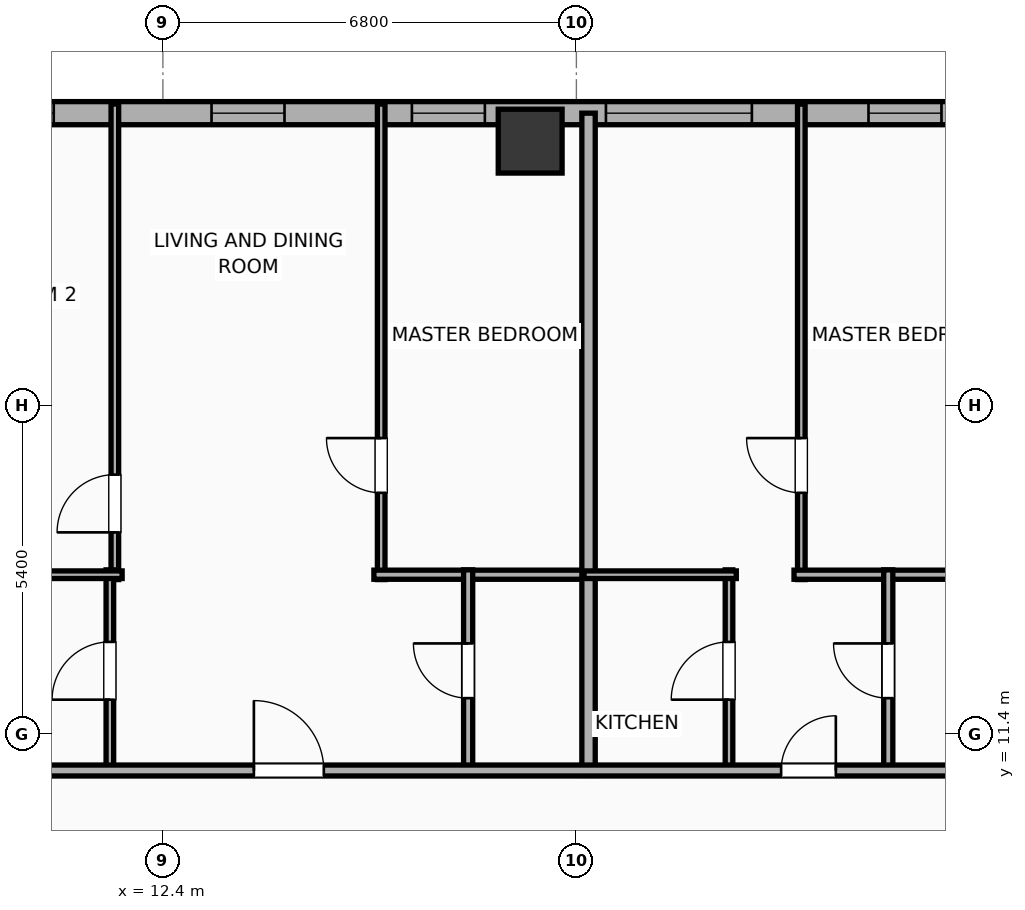
"""IFC4 building model, lengths in metres.
Left out: names, types, materials, properties, quantities, classifications, styles, units other than length and angle.
Written with IfcOpenShell. Run it as: python <this file> out.ifc"""

import sys

from ifc_helpers import new_model, si_unit, direction, frame, frame_2d, origin, origin_2d, place, context, subcontext, project, spatial, rectangle, hollow_rectangle, extrude, element, fill, save


model = new_model("IFC4")
c1 = context("Model", 3, precision=1e-05, world=origin(), true_north=direction((0.0, 1.0)))
c2 = subcontext(c1, "Body", "Model", "MODEL_VIEW")
j1 = project(units=[si_unit("LENGTHUNIT", "METRE"), si_unit("PLANEANGLEUNIT", "RADIAN")], contexts=[c1])
p1 = place(None, origin())
s1 = spatial("IfcSite", under=j1, at=p1, CompositionType="ELEMENT")
p2 = place(p1, origin())
s2 = spatial("IfcBuilding", under=s1, at=p2, CompositionType="ELEMENT")
p3 = place(p2, frame((0.0, 0.0, 109.2)))
s3 = spatial("IfcBuildingStorey", under=s2, at=p3, CompositionType="ELEMENT", Elevation=109.2)
p4 = place(p3, frame((18.44, 21.15, 0.0), z_axis=(0.0, 0.0, 1.0), x_axis=(1.0, 0.0, 0.0)))
e1 = element("IfcColumn", 1, at=p4, inside=s3, PredefinedType="COLUMN", context=c2, shape_type="SweptSolid", body=[
    extrude(hollow_rectangle(XDim=1.05, YDim=1.05, WallThickness=0.036, at=origin_2d()), origin(), (0.0, 0.0, 1.0), 3.9),
])
p5 = place(p3, frame((-25.381, 21.61, 0.0), z_axis=(0.0, 0.0, 1.0), x_axis=(1.0, 0.0, 0.0)))
e2 = element("IfcWall", 2, at=p5, inside=s3, PredefinedType="ELEMENTEDWALL", context=c2, shape_type="SweptSolid", body=[
    extrude(rectangle(XDim=54.763, YDim=0.38, at=frame_2d((27.381, 0.0))), origin(), (0.0, 0.0, 1.0), 3.65),
])
p6 = place(p5, frame((5.645, 0.0, 0.75)))
e3 = element("IfcOpeningElement", 3, at=p6, cuts=e2, PredefinedType="OPENING", context=c2, shape_type="SweptSolid", body=[
    extrude(rectangle(XDim=2.4, YDim=2.1, at=frame_2d((1.2, 1.05))), frame((0.0, 0.2, 0.0), z_axis=(0.0, -1.0, 0.0), x_axis=(1.0, 0.0, 0.0)), (0.0, 0.0, 1.0), 0.4),
])
p7 = place(p5, frame((45.067, 0.0, 0.75)))
e4 = element("IfcOpeningElement", 4, at=p7, cuts=e2, PredefinedType="OPENING", context=c2, shape_type="SweptSolid", body=[
    extrude(rectangle(XDim=2.4, YDim=2.1, at=frame_2d((1.2, 1.05))), frame((0.0, 0.2, 0.0), z_axis=(0.0, -1.0, 0.0), x_axis=(1.0, 0.0, 0.0)), (0.0, 0.0, 1.0), 0.4),
])
p8 = place(p5, frame((1.831, 0.0, 0.75)))
e5 = element("IfcOpeningElement", 5, at=p8, cuts=e2, PredefinedType="OPENING", context=c2, shape_type="SweptSolid", body=[
    extrude(rectangle(XDim=1.2, YDim=2.05, at=frame_2d((0.6, 1.025))), frame((0.0, 0.2, 0.0), z_axis=(0.0, -1.0, 0.0), x_axis=(1.0, 0.0, 0.0)), (0.0, 0.0, 1.0), 0.4),
])
p9 = place(p5, frame((8.996, 0.0, 0.75)))
e6 = element("IfcOpeningElement", 6, at=p9, cuts=e2, PredefinedType="OPENING", context=c2, shape_type="SweptSolid", body=[
    extrude(rectangle(XDim=1.2, YDim=2.05, at=frame_2d((0.6, 1.025))), frame((0.0, 0.2, 0.0), z_axis=(0.0, -1.0, 0.0), x_axis=(1.0, 0.0, 0.0)), (0.0, 0.0, 1.0), 0.4),
])
p10 = place(p5, frame((15.102, 0.0, 0.75)))
e7 = element("IfcOpeningElement", 7, at=p10, cuts=e2, PredefinedType="OPENING", context=c2, shape_type="SweptSolid", body=[
    extrude(rectangle(XDim=1.2, YDim=2.05, at=frame_2d((0.6, 1.025))), frame((0.0, 0.2, 0.0), z_axis=(0.0, -1.0, 0.0), x_axis=(1.0, 0.0, 0.0)), (0.0, 0.0, 1.0), 0.4),
])
p11 = place(p5, frame((12.352, 0.0, 0.75)))
e8 = element("IfcOpeningElement", 8, at=p11, cuts=e2, PredefinedType="OPENING", context=c2, shape_type="SweptSolid", body=[
    extrude(rectangle(XDim=1.2, YDim=2.05, at=frame_2d((0.6, 1.025))), frame((0.0, 0.2, 0.0), z_axis=(0.0, -1.0, 0.0), x_axis=(1.0, 0.0, 0.0)), (0.0, 0.0, 1.0), 0.4),
])
p12 = place(p5, frame((19.936, 0.0, 0.75)))
e9 = element("IfcOpeningElement", 9, at=p12, cuts=e2, PredefinedType="OPENING", context=c2, shape_type="SweptSolid", body=[
    extrude(rectangle(XDim=1.2, YDim=2.05, at=frame_2d((0.6, 1.025))), frame((0.0, 0.2, 0.0), z_axis=(0.0, -1.0, 0.0), x_axis=(1.0, 0.0, 0.0)), (0.0, 0.0, 1.0), 0.4),
])
p13 = place(p5, frame((17.786, 0.0, 0.75)))
e10 = element("IfcOpeningElement", 10, at=p13, cuts=e2, PredefinedType="OPENING", context=c2, shape_type="SweptSolid", body=[
    extrude(rectangle(XDim=1.2, YDim=2.05, at=frame_2d((0.6, 1.025))), frame((0.0, 0.2, 0.0), z_axis=(0.0, -1.0, 0.0), x_axis=(1.0, 0.0, 0.0)), (0.0, 0.0, 1.0), 0.4),
])
p14 = place(p5, frame((23.826, 0.0, 0.75)))
e11 = element("IfcOpeningElement", 11, at=p14, cuts=e2, PredefinedType="OPENING", context=c2, shape_type="SweptSolid", body=[
    extrude(rectangle(XDim=1.2, YDim=2.05, at=frame_2d((0.6, 1.025))), frame((0.0, 0.2, 0.0), z_axis=(0.0, -1.0, 0.0), x_axis=(1.0, 0.0, 0.0)), (0.0, 0.0, 1.0), 0.4),
])
p15 = place(p5, frame((26.576, 0.0, 0.75)))
e12 = element("IfcOpeningElement", 12, at=p15, cuts=e2, PredefinedType="OPENING", context=c2, shape_type="SweptSolid", body=[
    extrude(rectangle(XDim=1.2, YDim=2.05, at=frame_2d((0.6, 1.025))), frame((0.0, 0.2, 0.0), z_axis=(0.0, -1.0, 0.0), x_axis=(1.0, 0.0, 0.0)), (0.0, 0.0, 1.0), 0.4),
])
p16 = place(p5, frame((30.431, 0.0, 0.75)))
e13 = element("IfcOpeningElement", 13, at=p16, cuts=e2, PredefinedType="OPENING", context=c2, shape_type="SweptSolid", body=[
    extrude(rectangle(XDim=1.2, YDim=2.05, at=frame_2d((0.6, 1.025))), frame((0.0, 0.2, 0.0), z_axis=(0.0, -1.0, 0.0), x_axis=(1.0, 0.0, 0.0)), (0.0, 0.0, 1.0), 0.4),
])
p17 = place(p5, frame((38.581, 0.0, 0.75)))
e14 = element("IfcOpeningElement", 14, at=p17, cuts=e2, PredefinedType="OPENING", context=c2, shape_type="SweptSolid", body=[
    extrude(rectangle(XDim=1.2, YDim=2.05, at=frame_2d((0.6, 1.025))), frame((0.0, 0.2, 0.0), z_axis=(0.0, -1.0, 0.0), x_axis=(1.0, 0.0, 0.0)), (0.0, 0.0, 1.0), 0.4),
])
p18 = place(p5, frame((34.786, 0.0, 0.75)))
e15 = element("IfcOpeningElement", 15, at=p18, cuts=e2, PredefinedType="OPENING", context=c2, shape_type="SweptSolid", body=[
    extrude(rectangle(XDim=1.2, YDim=2.05, at=frame_2d((0.6, 1.025))), frame((0.0, 0.2, 0.0), z_axis=(0.0, -1.0, 0.0), x_axis=(1.0, 0.0, 0.0)), (0.0, 0.0, 1.0), 0.4),
])
p19 = place(p5, frame((41.876, 0.0, 0.75)))
e16 = element("IfcOpeningElement", 16, at=p19, cuts=e2, PredefinedType="OPENING", context=c2, shape_type="SweptSolid", body=[
    extrude(rectangle(XDim=1.2, YDim=2.05, at=frame_2d((0.6, 1.025))), frame((0.0, 0.2, 0.0), z_axis=(0.0, -1.0, 0.0), x_axis=(1.0, 0.0, 0.0)), (0.0, 0.0, 1.0), 0.4),
])
p20 = place(p5, frame((49.385, 0.0, 0.75)))
e17 = element("IfcOpeningElement", 17, at=p20, cuts=e2, PredefinedType="OPENING", context=c2, shape_type="SweptSolid", body=[
    extrude(rectangle(XDim=1.2, YDim=2.05, at=frame_2d((0.6, 1.025))), frame((0.0, 0.2, 0.0), z_axis=(0.0, -1.0, 0.0), x_axis=(1.0, 0.0, 0.0)), (0.0, 0.0, 1.0), 0.4),
])
p21 = place(p5, frame((52.181, 0.0, 0.75)))
e18 = element("IfcOpeningElement", 18, at=p21, cuts=e2, PredefinedType="OPENING", context=c2, shape_type="SweptSolid", body=[
    extrude(rectangle(XDim=1.2, YDim=2.05, at=frame_2d((0.6, 1.025))), frame((0.0, 0.2, 0.0), z_axis=(0.0, -1.0, 0.0), x_axis=(1.0, 0.0, 0.0)), (0.0, 0.0, 1.0), 0.4),
])
p22 = place(p3, frame((11.61, 13.94, 0.0), z_axis=(0.0, 0.0, 1.0), x_axis=(0.0, 1.0, 0.0)))
e19 = element("IfcWall", 19, at=p22, inside=s3, PredefinedType="PARTITIONING", context=c2, shape_type="SweptSolid", body=[
    extrude(rectangle(XDim=7.82, YDim=0.125, at=frame_2d((3.91, 0.0))), origin(), (0.0, 0.0, 1.0), 3.65),
])
p23 = place(p22, frame((0.776, 0.0, 0.0)))
e20 = element("IfcOpeningElement", 20, at=p23, cuts=e19, PredefinedType="OPENING", context=c2, shape_type="SweptSolid", body=[
    extrude(rectangle(XDim=0.95, YDim=2.05, at=frame_2d((0.475, 1.025))), frame((0.0, 0.073, 0.0), z_axis=(0.0, -1.0, 0.0), x_axis=(1.0, 0.0, 0.0)), (0.0, 0.0, 1.0), 0.145),
])
p24 = place(p3, frame((15.99, 13.94, 0.0), z_axis=(0.0, 0.0, 1.0), x_axis=(0.0, 1.0, 0.0)))
e21 = element("IfcWall", 21, at=p24, inside=s3, PredefinedType="PARTITIONING", context=c2, shape_type="SweptSolid", body=[
    extrude(rectangle(XDim=7.82, YDim=0.125, at=frame_2d((3.91, 0.0))), origin(), (0.0, 0.0, 1.0), 3.65),
])
p25 = place(p24, frame((1.427, 0.0, 0.0)))
e22 = element("IfcOpeningElement", 22, at=p25, cuts=e21, PredefinedType="OPENING", context=c2, shape_type="SweptSolid", body=[
    extrude(rectangle(XDim=0.9, YDim=2.05, at=frame_2d((0.45, 1.025))), frame((0.0, 0.073, 0.0), z_axis=(0.0, -1.0, 0.0), x_axis=(1.0, 0.0, 0.0)), (0.0, 0.0, 1.0), 0.145),
])
p26 = place(p3, frame((15.87, 14.02, 0.0), z_axis=(0.0, 0.0, 1.0), x_axis=(1.0, 0.0, 0.0)))
e23 = element("IfcWall", 23, at=p26, inside=s3, PredefinedType="PLUMBINGWALL", context=c2, shape_type="SweptSolid", body=[
    extrude(rectangle(XDim=3.605, YDim=0.15, at=frame_2d((1.802, 0.0))), origin(), (0.0, 0.0, 1.0), 3.65),
])
p27 = place(p3, frame((11.528, 10.78, 0.0), z_axis=(0.0, 0.0, 1.0), x_axis=(0.0, 1.0, 0.0)))
e24 = element("IfcWall", 24, at=p27, inside=s3, PredefinedType="PARTITIONING", context=c2, shape_type="SweptSolid", body=[
    extrude(rectangle(XDim=3.32, YDim=0.125, at=frame_2d((1.66, 0.0))), origin(), (0.0, 0.0, 1.0), 3.65),
])
p28 = place(p27, frame((1.185, 0.0, 0.0)))
e25 = element("IfcOpeningElement", 25, at=p28, cuts=e24, PredefinedType="OPENING", context=c2, shape_type="SweptSolid", body=[
    extrude(rectangle(XDim=0.95, YDim=2.05, at=frame_2d((0.475, 1.025))), frame((0.0, 0.073, 0.0), z_axis=(0.0, -1.0, 0.0), x_axis=(1.0, 0.0, 0.0)), (0.0, 0.0, 1.0), 0.145),
])
p29 = place(p3, frame((8.14, 14.02, 0.0), z_axis=(0.0, 0.0, 1.0), x_axis=(1.0, 0.0, 0.0)))
e26 = element("IfcWall", 26, at=p29, inside=s3, PredefinedType="PARTITIONING", context=c2, shape_type="SweptSolid", body=[
    extrude(rectangle(XDim=3.59, YDim=0.125, at=frame_2d((1.795, 0.0))), origin(), (0.0, 0.0, 1.0), 3.65),
])
p30 = place(p3, frame((17.42, 10.78, 0.0), z_axis=(0.0, 0.0, 1.0), x_axis=(0.0, 1.0, 0.0)))
e27 = element("IfcWall", 27, at=p30, inside=s3, PredefinedType="PLUMBINGWALL", context=c2, shape_type="SweptSolid", body=[
    extrude(rectangle(XDim=3.32, YDim=0.15, at=frame_2d((1.66, 0.0))), origin(), (0.0, 0.0, 1.0), 3.65),
])
p31 = place(p30, frame((1.21, 0.0, 0.0)))
e28 = element("IfcOpeningElement", 28, at=p31, cuts=e27, PredefinedType="OPENING", context=c2, shape_type="SweptSolid", body=[
    extrude(rectangle(XDim=0.9, YDim=2.05, at=frame_2d((0.45, 1.025))), frame((0.0, 0.085, 0.0), z_axis=(0.0, -1.0, 0.0), x_axis=(1.0, 0.0, 0.0)), (0.0, 0.0, 1.0), 0.17),
])
p32 = place(p3, frame((19.4, 10.72, 0.0), z_axis=(0.0, 0.0, 1.0), x_axis=(0.0, 1.0, 0.0)))
e29 = element("IfcWall", 29, at=p32, inside=s3, PredefinedType="PARTITIONING", context=c2, shape_type="SweptSolid", body=[
    extrude(rectangle(XDim=10.89, YDim=0.22, at=frame_2d((5.445, 0.0))), origin(), (0.0, 0.0, 1.0), 3.65),
])
p33 = place(p3, frame((22.899, 13.94, 0.0), z_axis=(0.0, 0.0, 1.0), x_axis=(0.0, 1.0, 0.0)))
e30 = element("IfcWall", 30, at=p33, inside=s3, PredefinedType="PARTITIONING", context=c2, shape_type="SweptSolid", body=[
    extrude(rectangle(XDim=7.82, YDim=0.125, at=frame_2d((3.91, 0.0))), origin(), (0.0, 0.0, 1.0), 3.65),
])
p34 = place(p33, frame((1.427, 0.0, 0.0)))
e31 = element("IfcOpeningElement", 31, at=p34, cuts=e30, PredefinedType="OPENING", context=c2, shape_type="SweptSolid", body=[
    extrude(rectangle(XDim=0.9, YDim=2.05, at=frame_2d((0.45, 1.025))), frame((0.0, 0.073, 0.0), z_axis=(0.0, -1.0, 0.0), x_axis=(1.0, 0.0, 0.0)), (0.0, 0.0, 1.0), 0.145),
])
p35 = place(p3, frame((22.779, 14.02, 0.0), z_axis=(0.0, 0.0, 1.0), x_axis=(1.0, 0.0, 0.0)))
e32 = element("IfcWall", 32, at=p35, inside=s3, PredefinedType="PLUMBINGWALL", context=c2, shape_type="SweptSolid", body=[
    extrude(rectangle(XDim=3.605, YDim=0.15, at=frame_2d((1.802, 0.0))), origin(), (0.0, 0.0, 1.0), 3.65),
])
p36 = place(p3, frame((21.71, 10.78, 0.0), z_axis=(0.0, 0.0, 1.0), x_axis=(0.0, 1.0, 0.0)))
e33 = element("IfcWall", 33, at=p36, inside=s3, PredefinedType="PARTITIONING", context=c2, shape_type="SweptSolid", body=[
    extrude(rectangle(XDim=3.32, YDim=0.125, at=frame_2d((1.66, 0.0))), origin(), (0.0, 0.0, 1.0), 3.65),
])
p37 = place(p36, frame((1.185, 0.0, 0.0)))
e34 = element("IfcOpeningElement", 34, at=p37, cuts=e33, PredefinedType="OPENING", context=c2, shape_type="SweptSolid", body=[
    extrude(rectangle(XDim=0.95, YDim=2.05, at=frame_2d((0.475, 1.025))), frame((0.0, 0.073, 0.0), z_axis=(0.0, -1.0, 0.0), x_axis=(1.0, 0.0, 0.0)), (0.0, 0.0, 1.0), 0.145),
])
p38 = place(p3, frame((19.325, 14.02, 0.0), z_axis=(0.0, 0.0, 1.0), x_axis=(1.0, 0.0, 0.0)))
e35 = element("IfcWall", 35, at=p38, inside=s3, PredefinedType="PARTITIONING", context=c2, shape_type="SweptSolid", body=[
    extrude(rectangle(XDim=2.505, YDim=0.125, at=frame_2d((1.252, 0.0))), origin(), (0.0, 0.0, 1.0), 3.65),
])
p39 = place(p3, frame((24.329, 10.78, 0.0), z_axis=(0.0, 0.0, 1.0), x_axis=(0.0, 1.0, 0.0)))
e36 = element("IfcWall", 36, at=p39, inside=s3, PredefinedType="PLUMBINGWALL", context=c2, shape_type="SweptSolid", body=[
    extrude(rectangle(XDim=3.32, YDim=0.15, at=frame_2d((1.66, 0.0))), origin(), (0.0, 0.0, 1.0), 3.65),
])
p40 = place(p39, frame((1.21, 0.0, 0.0)))
e37 = element("IfcOpeningElement", 37, at=p40, cuts=e36, PredefinedType="OPENING", context=c2, shape_type="SweptSolid", body=[
    extrude(rectangle(XDim=0.9, YDim=2.05, at=frame_2d((0.45, 1.025))), frame((0.0, 0.085, 0.0), z_axis=(0.0, -1.0, 0.0), x_axis=(1.0, 0.0, 0.0)), (0.0, 0.0, 1.0), 0.17),
])
p41 = place(p3, frame((-29.21, 10.8, 0.0), z_axis=(0.0, 0.0, 1.0), x_axis=(1.0, 0.0, 0.0)))
e38 = element("IfcWall", 38, at=p41, inside=s3, PredefinedType="PARTITIONING", context=c2, shape_type="SweptSolid", body=[
    extrude(rectangle(XDim=62.42, YDim=0.18, at=frame_2d((31.21, 0.0))), origin(), (0.0, 0.0, 1.0), 3.65),
])
p42 = place(p41, frame((3.457, 0.0, 0.0)))
e39 = element("IfcOpeningElement", 39, at=p42, cuts=e38, PredefinedType="OPENING", context=c2, shape_type="SweptSolid", body=[
    extrude(rectangle(XDim=1.15, YDim=2.05, at=frame_2d((0.575, 1.025))), frame((0.0, 0.1, 0.0), z_axis=(0.0, -1.0, 0.0), x_axis=(1.0, 0.0, 0.0)), (0.0, 0.0, 1.0), 0.2),
])
p43 = place(p41, frame((11.297, 0.0, 0.0)))
e40 = element("IfcOpeningElement", 40, at=p43, cuts=e38, PredefinedType="OPENING", context=c2, shape_type="SweptSolid", body=[
    extrude(rectangle(XDim=1.15, YDim=2.05, at=frame_2d((0.575, 1.025))), frame((0.0, 0.1, 0.0), z_axis=(0.0, -1.0, 0.0), x_axis=(1.0, 0.0, 0.0)), (0.0, 0.0, 1.0), 0.2),
])
p44 = place(p41, frame((18.925, 0.0, 0.0)))
e41 = element("IfcOpeningElement", 41, at=p44, cuts=e38, PredefinedType="OPENING", context=c2, shape_type="SweptSolid", body=[
    extrude(rectangle(XDim=1.15, YDim=2.05, at=frame_2d((0.575, 1.025))), frame((0.0, 0.1, 0.0), z_axis=(0.0, -1.0, 0.0), x_axis=(1.0, 0.0, 0.0)), (0.0, 0.0, 1.0), 0.2),
])
p45 = place(p41, frame((24.362, 0.0, 0.0)))
e42 = element("IfcOpeningElement", 42, at=p45, cuts=e38, PredefinedType="OPENING", context=c2, shape_type="SweptSolid", body=[
    extrude(rectangle(XDim=1.15, YDim=2.05, at=frame_2d((0.575, 1.025))), frame((0.0, 0.1, 0.0), z_axis=(0.0, -1.0, 0.0), x_axis=(1.0, 0.0, 0.0)), (0.0, 0.0, 1.0), 0.2),
])
p46 = place(p41, frame((27.708, 0.0, 0.0)))
e43 = element("IfcOpeningElement", 43, at=p46, cuts=e38, PredefinedType="OPENING", context=c2, shape_type="SweptSolid", body=[
    extrude(rectangle(XDim=1.15, YDim=2.05, at=frame_2d((0.575, 1.025))), frame((0.0, 0.1, 0.0), z_axis=(0.0, -1.0, 0.0), x_axis=(1.0, 0.0, 0.0)), (0.0, 0.0, 1.0), 0.2),
])
p47 = place(p41, frame((34.618, 0.0, 0.0)))
e44 = element("IfcOpeningElement", 44, at=p47, cuts=e38, PredefinedType="OPENING", context=c2, shape_type="SweptSolid", body=[
    extrude(rectangle(XDim=0.9, YDim=2.05, at=frame_2d((0.45, 1.025))), frame((0.0, 0.1, 0.0), z_axis=(0.0, -1.0, 0.0), x_axis=(1.0, 0.0, 0.0)), (0.0, 0.0, 1.0), 0.2),
])
p48 = place(p41, frame((43.106, 0.0, 0.0)))
e45 = element("IfcOpeningElement", 45, at=p48, cuts=e38, PredefinedType="OPENING", context=c2, shape_type="SweptSolid", body=[
    extrude(rectangle(XDim=1.15, YDim=2.05, at=frame_2d((0.575, 1.025))), frame((0.0, 0.1, 0.0), z_axis=(0.0, -1.0, 0.0), x_axis=(1.0, 0.0, 0.0)), (0.0, 0.0, 1.0), 0.2),
])
p49 = place(p41, frame((51.777, 0.0, 0.0)))
e46 = element("IfcOpeningElement", 46, at=p49, cuts=e38, PredefinedType="OPENING", context=c2, shape_type="SweptSolid", body=[
    extrude(rectangle(XDim=0.9, YDim=2.05, at=frame_2d((0.45, 1.025))), frame((0.0, 0.1, 0.0), z_axis=(0.0, -1.0, 0.0), x_axis=(1.0, 0.0, 0.0)), (0.0, 0.0, 1.0), 0.2),
])
p50 = place(p41, frame((58.718, 0.0, 0.0)))
e47 = element("IfcOpeningElement", 47, at=p50, cuts=e38, PredefinedType="OPENING", context=c2, shape_type="SweptSolid", body=[
    extrude(rectangle(XDim=0.9, YDim=2.05, at=frame_2d((0.45, 1.025))), frame((0.0, 0.1, 0.0), z_axis=(0.0, -1.0, 0.0), x_axis=(1.0, 0.0, 0.0)), (0.0, 0.0, 1.0), 0.2),
])
p51 = place(p7, origin())
e48 = element("IfcWindow", 48, at=p51, inside=s3, PartitioningType="SINGLE_PANEL", PredefinedType="WINDOW", context=c2, shape_type="SweptSolid", body=[
    extrude(rectangle(XDim=2.4, YDim=2.1, at=frame_2d((1.2, 1.05))), frame((0.0, 0.03, 0.0), z_axis=(0.0, -1.0, 0.0), x_axis=(1.0, 0.0, 0.0)), (0.0, 0.0, 1.0), 0.06),
])
fill(e4, e48)
p52 = place(p17, origin())
e49 = element("IfcWindow", 49, at=p52, inside=s3, PartitioningType="SINGLE_PANEL", PredefinedType="WINDOW", context=c2, shape_type="SweptSolid", body=[
    extrude(rectangle(XDim=1.2, YDim=2.05, at=frame_2d((0.6, 1.025))), frame((0.0, 0.03, 0.0), z_axis=(0.0, -1.0, 0.0), x_axis=(1.0, 0.0, 0.0)), (0.0, 0.0, 1.0), 0.06),
])
fill(e14, e49)
p53 = place(p18, origin())
e50 = element("IfcWindow", 50, at=p53, inside=s3, PartitioningType="SINGLE_PANEL", PredefinedType="WINDOW", context=c2, shape_type="SweptSolid", body=[
    extrude(rectangle(XDim=1.2, YDim=2.05, at=frame_2d((0.6, 1.025))), frame((0.0, 0.03, 0.0), z_axis=(0.0, -1.0, 0.0), x_axis=(1.0, 0.0, 0.0)), (0.0, 0.0, 1.0), 0.06),
])
fill(e15, e50)
p54 = place(p19, origin())
e51 = element("IfcWindow", 51, at=p54, inside=s3, PartitioningType="SINGLE_PANEL", PredefinedType="WINDOW", context=c2, shape_type="SweptSolid", body=[
    extrude(rectangle(XDim=1.2, YDim=2.05, at=frame_2d((0.6, 1.025))), frame((0.0, 0.03, 0.0), z_axis=(0.0, -1.0, 0.0), x_axis=(1.0, 0.0, 0.0)), (0.0, 0.0, 1.0), 0.06),
])
fill(e16, e51)
p55 = place(p20, origin())
e52 = element("IfcWindow", 52, at=p55, inside=s3, PartitioningType="SINGLE_PANEL", PredefinedType="WINDOW", context=c2, shape_type="SweptSolid", body=[
    extrude(rectangle(XDim=1.2, YDim=2.05, at=frame_2d((0.6, 1.025))), frame((0.0, 0.03, 0.0), z_axis=(0.0, -1.0, 0.0), x_axis=(1.0, 0.0, 0.0)), (0.0, 0.0, 1.0), 0.06),
])
fill(e17, e52)
p56 = place(p23, origin())
e53 = element("IfcDoor", 53, at=p56, inside=s3, OperationType="SINGLE_SWING_LEFT", PredefinedType="DOOR", context=c2, shape_type="SweptSolid", body=[
    extrude(rectangle(XDim=0.95, YDim=2.05, at=frame_2d((0.475, 1.025))), frame((0.0, 0.025, 0.0), z_axis=(0.0, -1.0, 0.0), x_axis=(1.0, 0.0, 0.0)), (0.0, 0.0, 1.0), 0.05),
])
fill(e20, e53)
p57 = place(p25, origin())
e54 = element("IfcDoor", 54, at=p57, inside=s3, OperationType="SINGLE_SWING_RIGHT", PredefinedType="DOOR", context=c2, shape_type="SweptSolid", body=[
    extrude(rectangle(XDim=0.9, YDim=2.05, at=frame_2d((0.45, 1.025))), frame((0.0, 0.025, 0.0), z_axis=(0.0, -1.0, 0.0), x_axis=(1.0, 0.0, 0.0)), (0.0, 0.0, 1.0), 0.05),
])
fill(e22, e54)
p58 = place(p28, origin())
e55 = element("IfcDoor", 55, at=p58, inside=s3, OperationType="SINGLE_SWING_LEFT", PredefinedType="DOOR", context=c2, shape_type="SweptSolid", body=[
    extrude(rectangle(XDim=0.95, YDim=2.05, at=frame_2d((0.475, 1.025))), frame((0.0, 0.025, 0.0), z_axis=(0.0, -1.0, 0.0), x_axis=(1.0, 0.0, 0.0)), (0.0, 0.0, 1.0), 0.05),
])
fill(e25, e55)
p59 = place(p31, origin())
e56 = element("IfcDoor", 56, at=p59, inside=s3, OperationType="SINGLE_SWING_RIGHT", PredefinedType="DOOR", context=c2, shape_type="SweptSolid", body=[
    extrude(rectangle(XDim=0.9, YDim=2.05, at=frame_2d((0.45, 1.025))), frame((0.0, 0.025, 0.0), z_axis=(0.0, -1.0, 0.0), x_axis=(1.0, 0.0, 0.0)), (0.0, 0.0, 1.0), 0.05),
])
fill(e28, e56)
p60 = place(p34, origin())
e57 = element("IfcDoor", 57, at=p60, inside=s3, OperationType="SINGLE_SWING_RIGHT", PredefinedType="DOOR", context=c2, shape_type="SweptSolid", body=[
    extrude(rectangle(XDim=0.9, YDim=2.05, at=frame_2d((0.45, 1.025))), frame((0.0, 0.025, 0.0), z_axis=(0.0, -1.0, 0.0), x_axis=(1.0, 0.0, 0.0)), (0.0, 0.0, 1.0), 0.05),
])
fill(e31, e57)
p61 = place(p37, origin())
e58 = element("IfcDoor", 58, at=p61, inside=s3, OperationType="SINGLE_SWING_LEFT", PredefinedType="DOOR", context=c2, shape_type="SweptSolid", body=[
    extrude(rectangle(XDim=0.95, YDim=2.05, at=frame_2d((0.475, 1.025))), frame((0.0, 0.025, 0.0), z_axis=(0.0, -1.0, 0.0), x_axis=(1.0, 0.0, 0.0)), (0.0, 0.0, 1.0), 0.05),
])
fill(e34, e58)
p62 = place(p40, origin())
e59 = element("IfcDoor", 59, at=p62, inside=s3, OperationType="SINGLE_SWING_RIGHT", PredefinedType="DOOR", context=c2, shape_type="SweptSolid", body=[
    extrude(rectangle(XDim=0.9, YDim=2.05, at=frame_2d((0.45, 1.025))), frame((0.0, 0.025, 0.0), z_axis=(0.0, -1.0, 0.0), x_axis=(1.0, 0.0, 0.0)), (0.0, 0.0, 1.0), 0.05),
])
fill(e37, e59)
p63 = place(p48, origin())
e60 = element("IfcDoor", 60, at=p63, inside=s3, OperationType="SINGLE_SWING_LEFT", PredefinedType="DOOR", context=c2, shape_type="SweptSolid", body=[
    extrude(rectangle(XDim=1.15, YDim=2.05, at=frame_2d((0.575, 1.025))), frame((0.0, 0.025, 0.0), z_axis=(0.0, -1.0, 0.0), x_axis=(1.0, 0.0, 0.0)), (0.0, 0.0, 1.0), 0.05),
])
fill(e45, e60)
p64 = place(p49, origin())
e61 = element("IfcDoor", 61, at=p64, inside=s3, OperationType="SINGLE_SWING_RIGHT", PredefinedType="DOOR", context=c2, shape_type="SweptSolid", body=[
    extrude(rectangle(XDim=0.9, YDim=2.05, at=frame_2d((0.45, 1.025))), frame((0.0, 0.025, 0.0), z_axis=(0.0, -1.0, 0.0), x_axis=(1.0, 0.0, 0.0)), (0.0, 0.0, 1.0), 0.05),
])
fill(e46, e61)
save(model, sys.argv[1])
